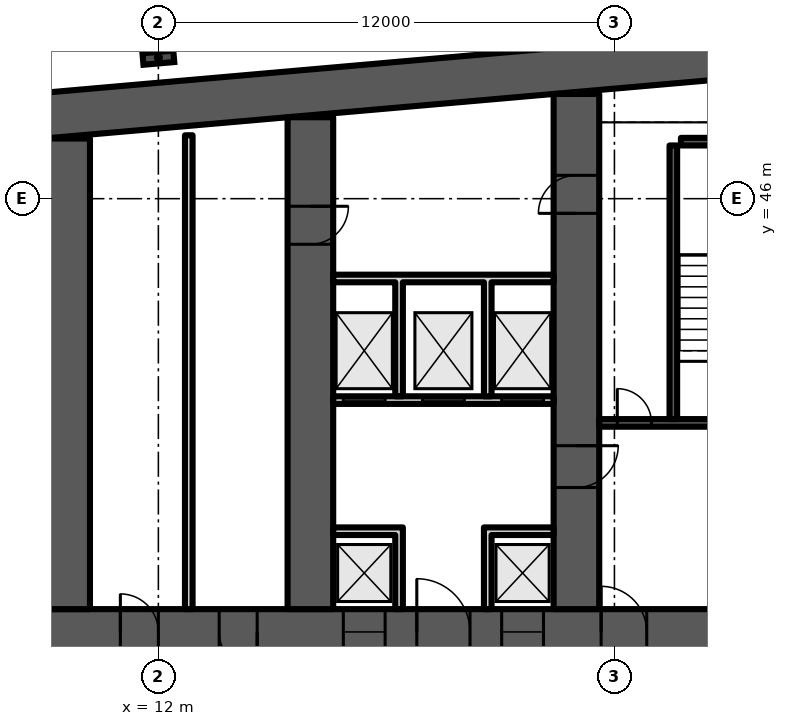
"""IFC4 building model, lengths in metres.
Left out: names, types, materials, properties, quantities, classifications, styles, units other than length and angle.
Written with IfcOpenShell. Run it as: python <this file> out.ifc"""

import sys

from ifc_helpers import new_model, si_unit, direction, frame, frame_2d, origin, origin_2d, place, context, subcontext, project, spatial, polyline, rectangle, i_section, outline, extrude, element, fill, save


model = new_model("IFC4")
c1 = context("Model", 3, precision=1e-05, world=origin(), true_north=direction((0.0, 1.0)))
c2 = subcontext(c1, "Body", "Model", "MODEL_VIEW")
j1 = project(units=[si_unit("LENGTHUNIT", "METRE"), si_unit("PLANEANGLEUNIT", "RADIAN")], contexts=[c1])
p1 = place(None, origin())
s1 = spatial("IfcSite", under=j1, at=p1, CompositionType="ELEMENT")
p2 = place(p1, origin())
s2 = spatial("IfcBuilding", under=s1, at=p2, CompositionType="ELEMENT")
p3 = place(p2, frame((0.0, 0.0, 59.5)))
s3 = spatial("IfcBuildingStorey", under=s2, at=p3, CompositionType="ELEMENT", Elevation=59.5)
p4 = place(p3, origin())
e1 = element("IfcWall", 1, at=p4, inside=s3, PredefinedType="SHEAR", context=c2, shape_type="SweptSolid", body=[
    extrude(outline(polyline([(9.0, 47.583), (37.0, 50.032), (65.0, 47.583), (65.0, 48.787), (37.0, 51.237), (9.0, 48.787), (9.0, 47.583)])), origin(), (0.0, 0.0, 1.0), 3.6),
])
p5 = place(p3, frame((9.0, 34.6, 0.0), z_axis=(0.0, 0.0, 1.0), x_axis=(1.0, 0.0, 0.0)))
e2 = element("IfcWall", 2, at=p5, inside=s3, PredefinedType="SHEAR", context=c2, shape_type="SweptSolid", body=[
    extrude(rectangle(XDim=56.0, YDim=1.2, at=frame_2d((28.0, 0.0))), origin(), (0.0, 0.0, 1.0), 3.6),
])
p6 = place(p5, frame((2.0, 0.0, 0.0)))
e3 = element("IfcOpeningElement", 3, at=p6, cuts=e2, PredefinedType="OPENING", context=c2, shape_type="SweptSolid", body=[
    extrude(rectangle(XDim=1.0, YDim=2.1, at=frame_2d((0.5, 1.05))), frame((0.0, 0.61, 0.0), z_axis=(0.0, -1.0, 0.0), x_axis=(1.0, 0.0, 0.0)), (0.0, 0.0, 1.0), 1.22),
])
p7 = place(p5, frame((4.6, 0.0, 0.0)))
e4 = element("IfcOpeningElement", 4, at=p7, cuts=e2, PredefinedType="OPENING", context=c2, shape_type="SweptSolid", body=[
    extrude(rectangle(XDim=1.0, YDim=2.1, at=frame_2d((0.5, 1.05))), frame((0.0, 0.61, 0.0), z_axis=(0.0, -1.0, 0.0), x_axis=(1.0, 0.0, 0.0)), (0.0, 0.0, 1.0), 1.22),
])
p8 = place(p5, frame((7.867, 0.0, 0.0)))
e5 = element("IfcOpeningElement", 5, at=p8, cuts=e2, PredefinedType="OPENING", context=c2, shape_type="SweptSolid", body=[
    extrude(rectangle(XDim=1.1, YDim=2.1, at=frame_2d((0.55, 1.05))), frame((0.0, 0.61, 0.0), z_axis=(0.0, -1.0, 0.0), x_axis=(1.0, 0.0, 0.0)), (0.0, 0.0, 1.0), 1.22),
])
p9 = place(p5, frame((12.033, 0.0, 0.0)))
e6 = element("IfcOpeningElement", 6, at=p9, cuts=e2, PredefinedType="OPENING", context=c2, shape_type="SweptSolid", body=[
    extrude(rectangle(XDim=1.1, YDim=2.1, at=frame_2d((0.55, 1.05))), frame((0.0, 0.61, 0.0), z_axis=(0.0, -1.0, 0.0), x_axis=(1.0, 0.0, 0.0)), (0.0, 0.0, 1.0), 1.22),
])
p10 = place(p5, frame((9.8, 0.0, 0.0)))
e7 = element("IfcOpeningElement", 7, at=p10, cuts=e2, PredefinedType="OPENING", context=c2, shape_type="SweptSolid", body=[
    extrude(rectangle(XDim=1.4, YDim=2.1, at=frame_2d((0.7, 1.05))), frame((0.0, 0.61, 0.0), z_axis=(0.0, -1.0, 0.0), x_axis=(1.0, 0.0, 0.0)), (0.0, 0.0, 1.0), 1.22),
])
p11 = place(p5, frame((14.65, 0.0, 0.0)))
e8 = element("IfcOpeningElement", 8, at=p11, cuts=e2, PredefinedType="OPENING", context=c2, shape_type="SweptSolid", body=[
    extrude(rectangle(XDim=1.2, YDim=2.1, at=frame_2d((0.6, 1.05))), frame((0.0, 0.61, 0.0), z_axis=(0.0, -1.0, 0.0), x_axis=(1.0, 0.0, 0.0)), (0.0, 0.0, 1.0), 1.22),
])
p12 = place(p5, frame((21.867, 0.0, 0.0)))
e9 = element("IfcOpeningElement", 9, at=p12, cuts=e2, PredefinedType="OPENING", context=c2, shape_type="SweptSolid", body=[
    extrude(rectangle(XDim=1.1, YDim=2.1, at=frame_2d((0.55, 1.05))), frame((0.0, 0.61, 0.0), z_axis=(0.0, -1.0, 0.0), x_axis=(1.0, 0.0, 0.0)), (0.0, 0.0, 1.0), 1.22),
])
p13 = place(p5, frame((26.033, 0.0, 0.0)))
e10 = element("IfcOpeningElement", 10, at=p13, cuts=e2, PredefinedType="OPENING", context=c2, shape_type="SweptSolid", body=[
    extrude(rectangle(XDim=1.1, YDim=2.1, at=frame_2d((0.55, 1.05))), frame((0.0, 0.61, 0.0), z_axis=(0.0, -1.0, 0.0), x_axis=(1.0, 0.0, 0.0)), (0.0, 0.0, 1.0), 1.22),
])
p14 = place(p5, frame((23.8, 0.0, 0.0)))
e11 = element("IfcOpeningElement", 11, at=p14, cuts=e2, PredefinedType="OPENING", context=c2, shape_type="SweptSolid", body=[
    extrude(rectangle(XDim=1.4, YDim=2.1, at=frame_2d((0.7, 1.05))), frame((0.0, 0.61, 0.0), z_axis=(0.0, -1.0, 0.0), x_axis=(1.0, 0.0, 0.0)), (0.0, 0.0, 1.0), 1.22),
])
p15 = place(p5, frame((28.867, 0.0, 0.0)))
e12 = element("IfcOpeningElement", 12, at=p15, cuts=e2, PredefinedType="OPENING", context=c2, shape_type="SweptSolid", body=[
    extrude(rectangle(XDim=1.1, YDim=2.1, at=frame_2d((0.55, 1.05))), frame((0.0, 0.61, 0.0), z_axis=(0.0, -1.0, 0.0), x_axis=(1.0, 0.0, 0.0)), (0.0, 0.0, 1.0), 1.22),
])
p16 = place(p5, frame((33.033, 0.0, 0.0)))
e13 = element("IfcOpeningElement", 13, at=p16, cuts=e2, PredefinedType="OPENING", context=c2, shape_type="SweptSolid", body=[
    extrude(rectangle(XDim=1.1, YDim=2.1, at=frame_2d((0.55, 1.05))), frame((0.0, 0.61, 0.0), z_axis=(0.0, -1.0, 0.0), x_axis=(1.0, 0.0, 0.0)), (0.0, 0.0, 1.0), 1.22),
])
p17 = place(p5, frame((40.15, 0.0, 0.0)))
e14 = element("IfcOpeningElement", 14, at=p17, cuts=e2, PredefinedType="OPENING", context=c2, shape_type="SweptSolid", body=[
    extrude(rectangle(XDim=1.2, YDim=2.1, at=frame_2d((0.6, 1.05))), frame((0.0, 0.61, 0.0), z_axis=(0.0, -1.0, 0.0), x_axis=(1.0, 0.0, 0.0)), (0.0, 0.0, 1.0), 1.22),
])
p18 = place(p5, frame((44.8, 0.0, 0.0)))
e15 = element("IfcOpeningElement", 15, at=p18, cuts=e2, PredefinedType="OPENING", context=c2, shape_type="SweptSolid", body=[
    extrude(rectangle(XDim=1.4, YDim=2.1, at=frame_2d((0.7, 1.05))), frame((0.0, 0.61, 0.0), z_axis=(0.0, -1.0, 0.0), x_axis=(1.0, 0.0, 0.0)), (0.0, 0.0, 1.0), 1.22),
])
p19 = place(p5, frame((49.867, 0.0, 0.0)))
e16 = element("IfcOpeningElement", 16, at=p19, cuts=e2, PredefinedType="OPENING", context=c2, shape_type="SweptSolid", body=[
    extrude(rectangle(XDim=1.1, YDim=2.1, at=frame_2d((0.55, 1.05))), frame((0.0, 0.61, 0.0), z_axis=(0.0, -1.0, 0.0), x_axis=(1.0, 0.0, 0.0)), (0.0, 0.0, 1.0), 1.22),
])
p20 = place(p5, frame((53.5, 0.0, 0.0)))
e17 = element("IfcOpeningElement", 17, at=p20, cuts=e2, PredefinedType="OPENING", context=c2, shape_type="SweptSolid", body=[
    extrude(rectangle(XDim=1.1, YDim=2.1, at=frame_2d((0.55, 1.05))), frame((0.0, 0.61, 0.0), z_axis=(0.0, -1.0, 0.0), x_axis=(1.0, 0.0, 0.0)), (0.0, 0.0, 1.0), 1.22),
])
p21 = place(p5, frame((51.567, 0.0, 0.0)))
e18 = element("IfcOpeningElement", 18, at=p21, cuts=e2, PredefinedType="OPENING", context=c2, shape_type="SweptSolid", body=[
    extrude(rectangle(XDim=1.4, YDim=2.1, at=frame_2d((0.7, 1.05))), frame((0.0, 0.61, 0.0), z_axis=(0.0, -1.0, 0.0), x_axis=(1.0, 0.0, 0.0)), (0.0, 0.0, 1.0), 1.22),
])
p22 = place(p3, frame((9.6, 35.2, 0.0), z_axis=(0.0, 0.0, 1.0), x_axis=(0.0, 1.0, 0.0)))
e19 = element("IfcWall", 19, at=p22, inside=s3, PredefinedType="SHEAR", context=c2, shape_type="SweptSolid", body=[
    extrude(rectangle(XDim=12.383, YDim=1.2, at=frame_2d((6.191, 0.0))), origin(), (0.0, 0.0, 1.0), 3.6),
])
p23 = place(p3, frame((16.0, 35.2, 0.0), z_axis=(0.0, 0.0, 1.0), x_axis=(0.0, 1.0, 0.0)))
e20 = element("IfcWall", 20, at=p23, inside=s3, PredefinedType="SHEAR", context=c2, shape_type="SweptSolid", body=[
    extrude(rectangle(XDim=12.943, YDim=1.2, at=frame_2d((6.471, 0.0))), origin(), (0.0, 0.0, 1.0), 3.6),
])
p24 = place(p23, frame((9.6, 0.0, 0.0)))
e21 = element("IfcOpeningElement", 21, at=p24, cuts=e20, PredefinedType="OPENING", context=c2, shape_type="SweptSolid", body=[
    extrude(rectangle(XDim=1.0, YDim=2.1, at=frame_2d((0.5, 1.05))), frame((0.0, 0.61, 0.0), z_axis=(0.0, -1.0, 0.0), x_axis=(1.0, 0.0, 0.0)), (0.0, 0.0, 1.0), 1.22),
])
p25 = place(p3, frame((23.0, 35.2, 0.0), z_axis=(0.0, 0.0, 1.0), x_axis=(0.0, 1.0, 0.0)))
e22 = element("IfcWall", 22, at=p25, inside=s3, PredefinedType="SHEAR", context=c2, shape_type="SweptSolid", body=[
    extrude(rectangle(XDim=13.555, YDim=1.2, at=frame_2d((6.778, 0.0))), origin(), (0.0, 0.0, 1.0), 3.6),
])
p26 = place(p25, frame((10.414, 0.0, 0.0)))
e23 = element("IfcOpeningElement", 23, at=p26, cuts=e22, PredefinedType="OPENING", context=c2, shape_type="SweptSolid", body=[
    extrude(rectangle(XDim=1.0, YDim=2.1, at=frame_2d((0.5, 1.05))), frame((0.0, 0.61, 0.0), z_axis=(0.0, -1.0, 0.0), x_axis=(1.0, 0.0, 0.0)), (0.0, 0.0, 1.0), 1.22),
])
p27 = place(p25, frame((3.2, 0.0, 0.0)))
e24 = element("IfcOpeningElement", 24, at=p27, cuts=e22, PredefinedType="OPENING", context=c2, shape_type="SweptSolid", body=[
    extrude(rectangle(XDim=1.1, YDim=2.1, at=frame_2d((0.55, 1.05))), frame((0.0, 0.61, 0.0), z_axis=(0.0, -1.0, 0.0), x_axis=(1.0, 0.0, 0.0)), (0.0, 0.0, 1.0), 1.22),
])
p28 = place(p3, frame((12.0, 49.71, 0.0), z_axis=(0.0, 0.0, 1.0), x_axis=(-0.087156, 0.996197, 0.0)))
e25 = element("IfcColumn", 25, at=p28, inside=s3, PredefinedType="COLUMN", context=c2, shape_type="SweptSolid", body=[
    extrude(i_section(OverallWidth=0.303, OverallDepth=0.814, WebThickness=0.021, FlangeThickness=0.04, FilletRadius=0.03, at=origin_2d()), origin(), (0.0, 0.0, 1.0), 3.6),
])
p29 = place(p3, frame((12.8, 35.2, 0.0), z_axis=(0.0, 0.0, 1.0), x_axis=(0.0, 1.0, 0.0)))
e26 = element("IfcWall", 26, at=p29, inside=s3, PredefinedType="PARTITIONING", context=c2, shape_type="SweptSolid", body=[
    extrude(rectangle(XDim=12.468, YDim=0.2, at=frame_2d((6.234, 0.0))), origin(), (0.0, 0.0, 1.0), 3.2),
])
p30 = place(p3, frame((16.6, 40.7, 0.0), z_axis=(0.0, 0.0, 1.0), x_axis=(1.0, 0.0, 0.0)))
e27 = element("IfcWall", 27, at=p30, inside=s3, PredefinedType="PARTITIONING", context=c2, shape_type="SweptSolid", body=[
    extrude(rectangle(XDim=5.8, YDim=0.2, at=frame_2d((2.9, 0.0))), origin(), (0.0, 0.0, 1.0), 3.2),
])
p31 = place(p30, frame((0.267, 0.0, 0.0)))
e28 = element("IfcOpeningElement", 28, at=p31, cuts=e27, PredefinedType="OPENING", context=c2, shape_type="SweptSolid", body=[
    extrude(rectangle(XDim=1.1, YDim=2.1, at=frame_2d((0.55, 1.05))), frame((0.0, 0.11, 0.0), z_axis=(0.0, -1.0, 0.0), x_axis=(1.0, 0.0, 0.0)), (0.0, 0.0, 1.0), 0.22),
])
p32 = place(p30, frame((2.35, 0.0, 0.0)))
e29 = element("IfcOpeningElement", 29, at=p32, cuts=e27, PredefinedType="OPENING", context=c2, shape_type="SweptSolid", body=[
    extrude(rectangle(XDim=1.1, YDim=2.1, at=frame_2d((0.55, 1.05))), frame((0.0, 0.11, 0.0), z_axis=(0.0, -1.0, 0.0), x_axis=(1.0, 0.0, 0.0)), (0.0, 0.0, 1.0), 0.22),
])
p33 = place(p30, frame((4.433, 0.0, 0.0)))
e30 = element("IfcOpeningElement", 30, at=p33, cuts=e27, PredefinedType="OPENING", context=c2, shape_type="SweptSolid", body=[
    extrude(rectangle(XDim=1.1, YDim=2.1, at=frame_2d((0.55, 1.05))), frame((0.0, 0.11, 0.0), z_axis=(0.0, -1.0, 0.0), x_axis=(1.0, 0.0, 0.0)), (0.0, 0.0, 1.0), 0.22),
])
p34 = place(p3, frame((0.0, 0.0, -0.0)))
e31 = element("IfcWall", 31, at=p34, inside=s3, PredefinedType="PARTITIONING", context=c2, shape_type="SweptSolid", body=[
    extrude(outline(polyline([(18.233, 37.15), (16.6, 37.15), (16.6, 37.35), (18.233, 37.35), (18.433, 37.35), (18.433, 35.2), (18.233, 35.2), (18.233, 37.15)])), origin(), (0.0, 0.0, 1.0), 3.2),
])
p35 = place(p3, frame((0.0, 0.0, -0.0)))
e32 = element("IfcWall", 32, at=p35, inside=s3, PredefinedType="PARTITIONING", context=c2, shape_type="SweptSolid", body=[
    extrude(outline(polyline([(20.567, 37.35), (20.767, 37.35), (22.4, 37.35), (22.4, 37.15), (20.767, 37.15), (20.767, 35.2), (20.567, 35.2), (20.567, 37.35)])), origin(), (0.0, 0.0, 1.0), 3.2),
])
p36 = place(p3, frame((0.0, 0.0, -0.0)))
e33 = element("IfcWall", 33, at=p36, inside=s3, PredefinedType="PARTITIONING", context=c2, shape_type="SweptSolid", body=[
    extrude(outline(polyline([(18.433, 40.8), (18.233, 40.8), (18.233, 43.8), (16.6, 43.8), (16.6, 44.0), (22.4, 44.0), (22.4, 43.8), (20.767, 43.8), (20.767, 40.8), (20.567, 40.8), (20.567, 43.8), (18.433, 43.8), (18.433, 40.8)])), origin(), (0.0, 0.0, 1.0), 3.2),
])
p37 = place(p3, frame((23.6, 40.1, 0.0), z_axis=(0.0, 0.0, 1.0), x_axis=(1.0, 0.0, 0.0)))
e34 = element("IfcWall", 34, at=p37, inside=s3, PredefinedType="SHEAR", context=c2, shape_type="SweptSolid", body=[
    extrude(rectangle(XDim=5.8, YDim=0.2, at=frame_2d((2.9, 0.0))), origin(), (0.0, 0.0, 1.0), 3.2),
])
p38 = place(p37, frame((3.325, 0.0, 0.0)))
e35 = element("IfcOpeningElement", 35, at=p38, cuts=e34, PredefinedType="OPENING", context=c2, shape_type="SweptSolid", body=[
    extrude(rectangle(XDim=1.2, YDim=2.1, at=frame_2d((0.6, 1.05))), frame((0.0, 0.11, 0.0), z_axis=(0.0, -1.0, 0.0), x_axis=(1.0, 0.0, 0.0)), (0.0, 0.0, 1.0), 0.22),
])
p39 = place(p37, frame((0.475, 0.0, 0.0)))
e36 = element("IfcOpeningElement", 36, at=p39, cuts=e34, PredefinedType="OPENING", context=c2, shape_type="SweptSolid", body=[
    extrude(rectangle(XDim=0.9, YDim=2.1, at=frame_2d((0.45, 1.05))), frame((0.0, 0.11, 0.0), z_axis=(0.0, -1.0, 0.0), x_axis=(1.0, 0.0, 0.0)), (0.0, 0.0, 1.0), 0.22),
])
p40 = place(p3, frame((25.55, 40.2, 0.0), z_axis=(0.0, 0.0, 1.0), x_axis=(0.0, 1.0, 0.0)))
e37 = element("IfcWall", 37, at=p40, inside=s3, PredefinedType="SHEAR", context=c2, shape_type="SweptSolid", body=[
    extrude(rectangle(XDim=7.2, YDim=0.2, at=frame_2d((3.6, 0.0))), origin(), (0.0, 0.0, 1.0), 3.2),
])
p41 = place(p3, frame((25.75, 47.5, 0.0), z_axis=(0.0, 0.0, 1.0), x_axis=(1.0, 0.0, 0.0)))
e38 = element("IfcWall", 38, at=p41, inside=s3, PredefinedType="SHEAR", context=c2, shape_type="SweptSolid", body=[
    extrude(rectangle(XDim=3.65, YDim=0.2, at=frame_2d((1.825, 0.0))), origin(), (0.0, 0.0, 1.0), 3.2),
])
p42 = place(p6, origin())
e39 = element("IfcDoor", 39, at=p42, inside=s3, OperationType="SINGLE_SWING_LEFT", PredefinedType="DOOR", context=c2, shape_type="SweptSolid", body=[
    extrude(rectangle(XDim=1.0, YDim=2.1, at=frame_2d((0.5, 1.05))), frame((0.0, 0.6, 0.0), z_axis=(0.0, -1.0, 0.0), x_axis=(1.0, 0.0, 0.0)), (0.0, 0.0, 1.0), 1.199),
])
fill(e3, e39)
p43 = place(p7, origin())
e40 = element("IfcDoor", 40, at=p43, inside=s3, OperationType="SINGLE_SWING_RIGHT", PredefinedType="DOOR", context=c2, shape_type="SweptSolid", body=[
    extrude(rectangle(XDim=1.0, YDim=2.1, at=frame_2d((0.5, 1.05))), frame((0.0, 0.6, 0.0), z_axis=(0.0, -1.0, 0.0), x_axis=(1.0, 0.0, 0.0)), (0.0, 0.0, 1.0), 1.199),
])
fill(e4, e40)
p44 = place(p8, origin())
e41 = element("IfcDoor", 41, at=p44, inside=s3, OperationType="DOUBLE_DOOR_SLIDING", PredefinedType="DOOR", context=c2, shape_type="SweptSolid", body=[
    extrude(rectangle(XDim=1.1, YDim=2.1, at=frame_2d((0.55, 1.05))), frame((0.0, 0.025, 0.0), z_axis=(0.0, -1.0, 0.0), x_axis=(1.0, 0.0, 0.0)), (0.0, 0.0, 1.0), 0.05),
])
fill(e5, e41)
p45 = place(p9, origin())
e42 = element("IfcDoor", 42, at=p45, inside=s3, OperationType="DOUBLE_DOOR_SLIDING", PredefinedType="DOOR", context=c2, shape_type="SweptSolid", body=[
    extrude(rectangle(XDim=1.1, YDim=2.1, at=frame_2d((0.55, 1.05))), frame((0.0, 0.025, 0.0), z_axis=(0.0, -1.0, 0.0), x_axis=(1.0, 0.0, 0.0)), (0.0, 0.0, 1.0), 0.05),
])
fill(e6, e42)
p46 = place(p10, origin())
e43 = element("IfcDoor", 43, at=p46, inside=s3, OperationType="DOUBLE_DOOR_SINGLE_SWING", PredefinedType="DOOR", context=c2, shape_type="SweptSolid", body=[
    extrude(rectangle(XDim=1.4, YDim=2.1, at=frame_2d((0.7, 1.05))), frame((0.0, 0.025, 0.0), z_axis=(0.0, -1.0, 0.0), x_axis=(1.0, 0.0, 0.0)), (0.0, 0.0, 1.0), 0.05),
])
fill(e7, e43)
p47 = place(p31, origin())
e44 = element("IfcDoor", 44, at=p47, inside=s3, OperationType="DOUBLE_DOOR_SLIDING", PredefinedType="DOOR", context=c2, shape_type="SweptSolid", body=[
    extrude(rectangle(XDim=1.1, YDim=2.1, at=frame_2d((0.55, 1.05))), frame((0.0, 0.025, 0.0), z_axis=(0.0, -1.0, 0.0), x_axis=(1.0, 0.0, 0.0)), (0.0, 0.0, 1.0), 0.05),
])
fill(e28, e44)
p48 = place(p32, origin())
e45 = element("IfcDoor", 45, at=p48, inside=s3, OperationType="DOUBLE_DOOR_SLIDING", PredefinedType="DOOR", context=c2, shape_type="SweptSolid", body=[
    extrude(rectangle(XDim=1.1, YDim=2.1, at=frame_2d((0.55, 1.05))), frame((0.0, 0.025, 0.0), z_axis=(0.0, -1.0, 0.0), x_axis=(1.0, 0.0, 0.0)), (0.0, 0.0, 1.0), 0.05),
])
fill(e29, e45)
p49 = place(p33, origin())
e46 = element("IfcDoor", 46, at=p49, inside=s3, OperationType="DOUBLE_DOOR_SLIDING", PredefinedType="DOOR", context=c2, shape_type="SweptSolid", body=[
    extrude(rectangle(XDim=1.1, YDim=2.1, at=frame_2d((0.55, 1.05))), frame((0.0, 0.025, 0.0), z_axis=(0.0, -1.0, 0.0), x_axis=(1.0, 0.0, 0.0)), (0.0, 0.0, 1.0), 0.05),
])
fill(e30, e46)
p50 = place(p26, origin())
e47 = element("IfcDoor", 47, at=p50, inside=s3, OperationType="SINGLE_SWING_LEFT", PredefinedType="DOOR", context=c2, shape_type="SweptSolid", body=[
    extrude(rectangle(XDim=1.0, YDim=2.1, at=frame_2d((0.5, 1.05))), frame((0.0, 0.6, 0.0), z_axis=(0.0, -1.0, 0.0), x_axis=(1.0, 0.0, 0.0)), (0.0, 0.0, 1.0), 1.199),
])
fill(e23, e47)
p51 = place(p39, origin())
e48 = element("IfcDoor", 48, at=p51, inside=s3, OperationType="SINGLE_SWING_LEFT", PredefinedType="DOOR", context=c2, shape_type="SweptSolid", body=[
    extrude(rectangle(XDim=0.9, YDim=2.1, at=frame_2d((0.45, 1.05))), frame((0.0, 0.025, 0.0), z_axis=(0.0, -1.0, 0.0), x_axis=(1.0, 0.0, 0.0)), (0.0, 0.0, 1.0), 0.05),
])
fill(e36, e48)
p52 = place(p11, origin())
e49 = element("IfcDoor", 49, at=p52, inside=s3, OperationType="SINGLE_SWING_LEFT", PredefinedType="DOOR", context=c2, shape_type="SweptSolid", body=[
    extrude(rectangle(XDim=1.2, YDim=2.1, at=frame_2d((0.6, 1.05))), frame((0.0, 0.025, 0.0), z_axis=(0.0, -1.0, 0.0), x_axis=(1.0, 0.0, 0.0)), (0.0, 0.0, 1.0), 0.05),
])
fill(e8, e49)
p53 = place(p24, origin())
e50 = element("IfcDoor", 50, at=p53, inside=s3, OperationType="SINGLE_SWING_RIGHT", PredefinedType="DOOR", context=c2, shape_type="SweptSolid", body=[
    extrude(rectangle(XDim=1.0, YDim=2.1, at=frame_2d((0.5, 1.05))), frame((0.0, 0.6, 0.0), z_axis=(0.0, -1.0, 0.0), x_axis=(1.0, 0.0, 0.0)), (0.0, 0.0, 1.0), 1.199),
])
fill(e21, e50)
p54 = place(p27, origin())
e51 = element("IfcDoor", 51, at=p54, inside=s3, OperationType="SINGLE_SWING_RIGHT", PredefinedType="DOOR", context=c2, shape_type="SweptSolid", body=[
    extrude(rectangle(XDim=1.1, YDim=2.1, at=frame_2d((0.55, 1.05))), frame((0.0, 0.025, 0.0), z_axis=(0.0, -1.0, 0.0), x_axis=(1.0, 0.0, 0.0)), (0.0, 0.0, 1.0), 0.05),
])
fill(e24, e51)
save(model, sys.argv[1])
